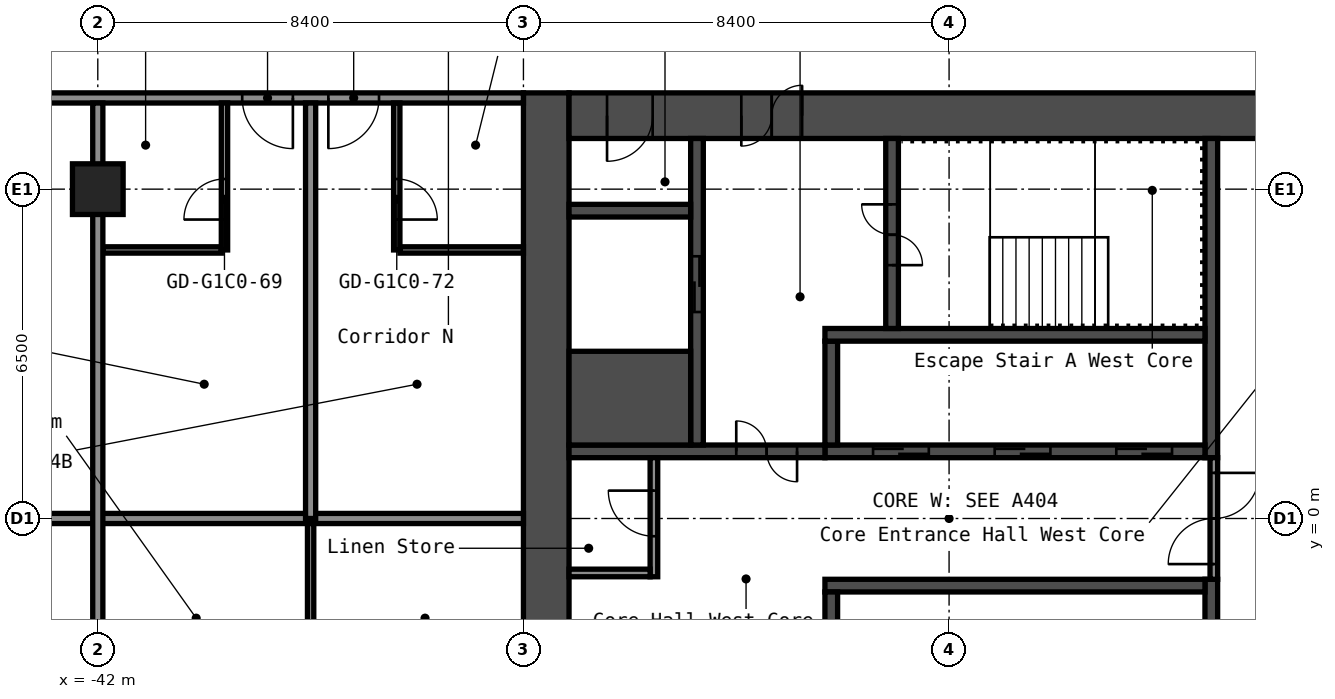
"""IFC4 building model, lengths in metres.
Left out: names, types, materials, properties, quantities, classifications, styles, units other than length and angle.
Written with IfcOpenShell. Run it as: python <this file> out.ifc"""

import sys

from ifc_helpers import new_model, si_unit, direction, frame, frame_2d, origin, origin_2d, place, context, subcontext, project, spatial, rectangle, hollow_rectangle, extrude, element, fill, save


model = new_model("IFC4")
c1 = context("Model", 3, precision=1e-05, world=origin(), true_north=direction((0.0, 1.0)))
c2 = subcontext(c1, "Body", "Model", "MODEL_VIEW")
j1 = project(units=[si_unit("LENGTHUNIT", "METRE"), si_unit("PLANEANGLEUNIT", "RADIAN")], contexts=[c1])
p1 = place(None, origin())
s1 = spatial("IfcSite", under=j1, at=p1, CompositionType="ELEMENT")
p2 = place(p1, origin())
s2 = spatial("IfcBuilding", under=s1, at=p2, CompositionType="ELEMENT")
p3 = place(p2, frame((0.0, 0.0, 26.2)))
s3 = spatial("IfcBuildingStorey", under=s2, at=p3, CompositionType="ELEMENT", Elevation=26.2)
p4 = place(p3, frame((-42.0, 6.5, 0.0), z_axis=(0.0, 0.0, 1.0), x_axis=(1.0, 0.0, 0.0)))
e1 = element("IfcColumn", 1, at=p4, inside=s3, PredefinedType="COLUMN", context=c2, shape_type="SweptSolid", body=[
    extrude(hollow_rectangle(XDim=1.0, YDim=1.0, WallThickness=0.04, at=origin_2d()), origin(), (0.0, 0.0, 1.0), 2.8),
])
p5 = place(p3, frame((-33.15, -8.4, 0.0), z_axis=(0.0, 0.0, 1.0), x_axis=(0.0, 1.0, 0.0)))
e2 = element("IfcWall", 2, at=p5, inside=s3, PredefinedType="SHEAR", context=c2, shape_type="SweptSolid", body=[
    extrude(rectangle(XDim=16.8, YDim=0.9, at=frame_2d((8.4, 0.0))), origin(), (0.0, 0.0, 1.0), 2.8),
])
p6 = place(p3, frame((-32.7, 7.95, 0.0), z_axis=(0.0, 0.0, 1.0), x_axis=(1.0, 0.0, 0.0)))
e3 = element("IfcWall", 3, at=p6, inside=s3, PredefinedType="SHEAR", context=c2, shape_type="SweptSolid", body=[
    extrude(rectangle(XDim=15.0, YDim=0.9, at=frame_2d((7.5, 0.0))), origin(), (0.0, 0.0, 1.0), 2.8),
])
p7 = place(p6, frame((3.4, 0.0, 0.0)))
e4 = element("IfcOpeningElement", 4, at=p7, cuts=e3, PredefinedType="OPENING", context=c2, shape_type="SweptSolid", body=[
    extrude(rectangle(XDim=1.2, YDim=2.1, at=frame_2d((0.6, 1.05))), frame((0.0, 0.46, 0.0), z_axis=(0.0, -1.0, 0.0), x_axis=(1.0, 0.0, 0.0)), (0.0, 0.0, 1.0), 0.92),
])
p8 = place(p6, frame((0.75, 0.0, 0.0)))
e5 = element("IfcOpeningElement", 5, at=p8, cuts=e3, PredefinedType="OPENING", context=c2, shape_type="SweptSolid", body=[
    extrude(rectangle(XDim=0.9, YDim=2.1, at=frame_2d((0.45, 1.05))), frame((0.0, 0.46, 0.0), z_axis=(0.0, -1.0, 0.0), x_axis=(1.0, 0.0, 0.0)), (0.0, 0.0, 1.0), 0.92),
])
p9 = place(p3, frame((-20.025, 1.2, 0.0), z_axis=(0.0, 0.0, 1.0), x_axis=(0.0, 1.0, 0.0)))
e6 = element("IfcWall", 6, at=p9, inside=s3, PredefinedType="SHEAR", context=c2, shape_type="SweptSolid", body=[
    extrude(rectangle(XDim=6.3, YDim=0.25, at=frame_2d((3.15, 0.0))), origin(), (0.0, 0.0, 1.0), 2.8),
])
p10 = place(p3, frame((-20.025, -7.5, 0.0), z_axis=(0.0, 0.0, 1.0), x_axis=(0.0, 1.0, 0.0)))
e7 = element("IfcWall", 7, at=p10, inside=s3, PredefinedType="SHEAR", context=c2, shape_type="SweptSolid", body=[
    extrude(rectangle(XDim=6.3, YDim=0.25, at=frame_2d((3.15, 0.0))), origin(), (0.0, 0.0, 1.0), 2.8),
])
p11 = place(p10, frame((2.4, 0.0, 0.0)))
e8 = element("IfcOpeningElement", 8, at=p11, cuts=e7, PredefinedType="OPENING", context=c2, shape_type="SweptSolid", body=[
    extrude(rectangle(XDim=1.0, YDim=2.1, at=frame_2d((0.5, 1.05))), frame((0.0, 0.135, 0.0), z_axis=(0.0, -1.0, 0.0), x_axis=(1.0, 0.0, 0.0)), (0.0, 0.0, 1.0), 0.27),
])
p12 = place(p3, frame((-27.65, 1.325, 0.0), z_axis=(0.0, 0.0, 1.0), x_axis=(1.0, 0.0, 0.0)))
e9 = element("IfcWall", 9, at=p12, inside=s3, PredefinedType="SHEAR", context=c2, shape_type="SweptSolid", body=[
    extrude(rectangle(XDim=7.5, YDim=0.25, at=frame_2d((3.75, 0.0))), origin(), (0.0, 0.0, 1.0), 2.8),
])
p13 = place(p12, frame((5.75, 0.0, 0.0)))
e10 = element("IfcOpeningElement", 10, at=p13, cuts=e9, PredefinedType="OPENING", context=c2, shape_type="SweptSolid", body=[
    extrude(rectangle(XDim=1.1, YDim=2.1, at=frame_2d((0.55, 1.05))), frame((0.0, 0.135, 0.0), z_axis=(0.0, -1.0, 0.0), x_axis=(1.0, 0.0, 0.0)), (0.0, 0.0, 1.0), 0.27),
])
p14 = place(p12, frame((3.35, 0.0, 0.0)))
e11 = element("IfcOpeningElement", 11, at=p14, cuts=e9, PredefinedType="OPENING", context=c2, shape_type="SweptSolid", body=[
    extrude(rectangle(XDim=1.1, YDim=2.1, at=frame_2d((0.55, 1.05))), frame((0.0, 0.135, 0.0), z_axis=(0.0, -1.0, 0.0), x_axis=(1.0, 0.0, 0.0)), (0.0, 0.0, 1.0), 0.27),
])
p15 = place(p12, frame((0.95, 0.0, 0.0)))
e12 = element("IfcOpeningElement", 12, at=p15, cuts=e9, PredefinedType="OPENING", context=c2, shape_type="SweptSolid", body=[
    extrude(rectangle(XDim=1.1, YDim=2.1, at=frame_2d((0.55, 1.05))), frame((0.0, 0.135, 0.0), z_axis=(0.0, -1.0, 0.0), x_axis=(1.0, 0.0, 0.0)), (0.0, 0.0, 1.0), 0.27),
])
p16 = place(p3, frame((-27.525, 1.45, 0.0), z_axis=(0.0, 0.0, 1.0), x_axis=(0.0, 1.0, 0.0)))
e13 = element("IfcWall", 13, at=p16, inside=s3, PredefinedType="SHEAR", context=c2, shape_type="SweptSolid", body=[
    extrude(rectangle(XDim=2.05, YDim=0.25, at=frame_2d((1.025, 0.0))), origin(), (0.0, 0.0, 1.0), 2.8),
])
p17 = place(p3, frame((-27.65, 3.625, 0.0), z_axis=(0.0, 0.0, 1.0), x_axis=(1.0, 0.0, 0.0)))
e14 = element("IfcWall", 14, at=p17, inside=s3, PredefinedType="SHEAR", context=c2, shape_type="SweptSolid", body=[
    extrude(rectangle(XDim=7.5, YDim=0.25, at=frame_2d((3.75, 0.0))), origin(), (0.0, 0.0, 1.0), 2.8),
])
p18 = place(p3, frame((-26.325, 3.75, 0.0), z_axis=(0.0, 0.0, 1.0), x_axis=(0.0, 1.0, 0.0)))
e15 = element("IfcWall", 15, at=p18, inside=s3, PredefinedType="SHEAR", context=c2, shape_type="SweptSolid", body=[
    extrude(rectangle(XDim=3.75, YDim=0.25, at=frame_2d((1.875, 0.0))), origin(), (0.0, 0.0, 1.0), 2.8),
])
p19 = place(p18, frame((1.25, 0.0, 0.0)))
e16 = element("IfcOpeningElement", 16, at=p19, cuts=e15, PredefinedType="OPENING", context=c2, shape_type="SweptSolid", body=[
    extrude(rectangle(XDim=1.2, YDim=2.1, at=frame_2d((0.6, 1.05))), frame((0.0, 0.135, 0.0), z_axis=(0.0, -1.0, 0.0), x_axis=(1.0, 0.0, 0.0)), (0.0, 0.0, 1.0), 0.27),
])
p20 = place(p3, frame((-32.7, 1.325, 0.0), z_axis=(0.0, 0.0, 1.0), x_axis=(1.0, 0.0, 0.0)))
e17 = element("IfcWall", 17, at=p20, inside=s3, PredefinedType="SHEAR", context=c2, shape_type="SweptSolid", body=[
    extrude(rectangle(XDim=5.05, YDim=0.25, at=frame_2d((2.525, 0.0))), origin(), (0.0, 0.0, 1.0), 2.8),
])
p21 = place(p20, frame((3.3, 0.0, 0.0)))
e18 = element("IfcOpeningElement", 18, at=p21, cuts=e17, PredefinedType="OPENING", context=c2, shape_type="SweptSolid", body=[
    extrude(rectangle(XDim=1.2, YDim=2.1, at=frame_2d((0.6, 1.05))), frame((0.0, 0.135, 0.0), z_axis=(0.0, -1.0, 0.0), x_axis=(1.0, 0.0, 0.0)), (0.0, 0.0, 1.0), 0.27),
])
p22 = place(p3, frame((-30.175, 1.45, 0.0), z_axis=(0.0, 0.0, 1.0), x_axis=(0.0, 1.0, 0.0)))
e19 = element("IfcWall", 19, at=p22, inside=s3, PredefinedType="SHEAR", context=c2, shape_type="SweptSolid", body=[
    extrude(rectangle(XDim=6.05, YDim=0.25, at=frame_2d((3.025, 0.0))), origin(), (0.0, 0.0, 1.0), 2.8),
])
p23 = place(p22, frame((2.625, 0.0, 0.0)))
e20 = element("IfcOpeningElement", 20, at=p23, cuts=e19, PredefinedType="OPENING", context=c2, shape_type="SweptSolid", body=[
    extrude(rectangle(XDim=1.1, YDim=2.1, at=frame_2d((0.55, 1.05))), frame((0.0, 0.135, 0.0), z_axis=(0.0, -1.0, 0.0), x_axis=(1.0, 0.0, 0.0)), (0.0, 0.0, 1.0), 0.27),
])
p24 = place(p3, frame((-32.7, 2.375, 0.0), z_axis=(0.0, 0.0, 1.0), x_axis=(1.0, 0.0, 0.0)))
e21 = element("IfcWall", 21, at=p24, inside=s3, PredefinedType="SHEAR", context=c2, shape_type="SweptSolid", body=[
    extrude(rectangle(XDim=2.4, YDim=1.85, at=frame_2d((1.2, 0.0))), origin(), (0.0, 0.0, 1.0), 2.8),
])
p25 = place(p3, frame((-32.7, 6.075, 0.0), z_axis=(0.0, 0.0, 1.0), x_axis=(1.0, 0.0, 0.0)))
e22 = element("IfcWall", 22, at=p25, inside=s3, PredefinedType="SHEAR", context=c2, shape_type="SweptSolid", body=[
    extrude(rectangle(XDim=2.4, YDim=0.25, at=frame_2d((1.2, 0.0))), origin(), (0.0, 0.0, 1.0), 2.8),
])
p26 = place(p3, frame((-27.65, -1.325, 0.0), z_axis=(0.0, 0.0, 1.0), x_axis=(1.0, 0.0, 0.0)))
e23 = element("IfcWall", 23, at=p26, inside=s3, PredefinedType="SHEAR", context=c2, shape_type="SweptSolid", body=[
    extrude(rectangle(XDim=7.5, YDim=0.25, at=frame_2d((3.75, 0.0))), origin(), (0.0, 0.0, 1.0), 2.8),
])
p27 = place(p3, frame((-27.525, -3.5, 0.0), z_axis=(0.0, 0.0, 1.0), x_axis=(0.0, 1.0, 0.0)))
e24 = element("IfcWall", 24, at=p27, inside=s3, PredefinedType="SHEAR", context=c2, shape_type="SweptSolid", body=[
    extrude(rectangle(XDim=2.05, YDim=0.25, at=frame_2d((1.025, 0.0))), origin(), (0.0, 0.0, 1.0), 2.8),
])
p28 = place(p3, frame((-19.975, -1.2, 0.0), z_axis=(0.0, 0.0, 1.0), x_axis=(0.0, 1.0, 0.0)))
e25 = element("IfcWall", 25, at=p28, inside=s3, PredefinedType="PARTITIONING", context=c2, shape_type="SweptSolid", body=[
    extrude(rectangle(XDim=2.4, YDim=0.15, at=frame_2d((1.2, 0.0))), origin(), (0.0, 0.0, 1.0), 2.8),
])
p29 = place(p28, frame((0.3, 0.0, 0.0)))
e26 = element("IfcOpeningElement", 26, at=p29, cuts=e25, PredefinedType="OPENING", context=c2, shape_type="SweptSolid", body=[
    extrude(rectangle(XDim=1.8, YDim=2.1, at=frame_2d((0.9, 1.05))), frame((0.0, 0.085, 0.0), z_axis=(0.0, -1.0, 0.0), x_axis=(1.0, 0.0, 0.0)), (0.0, 0.0, 1.0), 0.17),
])
p30 = place(p3, frame((-31.025, -1.15, 0.0), z_axis=(0.0, 0.0, 1.0), x_axis=(0.0, 1.0, 0.0)))
e27 = element("IfcWall", 27, at=p30, inside=s3, PredefinedType="PARTITIONING", context=c2, shape_type="SweptSolid", body=[
    extrude(rectangle(XDim=2.35, YDim=0.15, at=frame_2d((1.175, 0.0))), origin(), (0.0, 0.0, 1.0), 2.8),
])
p31 = place(p30, frame((0.8, 0.0, 0.0)))
e28 = element("IfcOpeningElement", 28, at=p31, cuts=e27, PredefinedType="OPENING", context=c2, shape_type="SweptSolid", body=[
    extrude(rectangle(XDim=0.9, YDim=2.1, at=frame_2d((0.45, 1.05))), frame((0.0, 0.085, 0.0), z_axis=(0.0, -1.0, 0.0), x_axis=(1.0, 0.0, 0.0)), (0.0, 0.0, 1.0), 0.17),
])
p32 = place(p3, frame((-32.7, -1.075, 0.0), z_axis=(0.0, 0.0, 1.0), x_axis=(1.0, 0.0, 0.0)))
e29 = element("IfcWall", 29, at=p32, inside=s3, PredefinedType="PARTITIONING", context=c2, shape_type="SweptSolid", body=[
    extrude(rectangle(XDim=1.6, YDim=0.15, at=frame_2d((0.8, 0.0))), origin(), (0.0, 0.0, 1.0), 2.8),
])
p33 = place(p3, frame((-48.5, 0.0, 0.0), z_axis=(0.0, 0.0, 1.0), x_axis=(1.0, 0.0, 0.0)))
e30 = element("IfcWall", 30, at=p33, inside=s3, PredefinedType="PARTITIONING", context=c2, shape_type="SweptSolid", body=[
    extrude(rectangle(XDim=14.9, YDim=0.2, at=frame_2d((7.45, 0.0))), origin(), (0.0, 0.0, 1.0), 2.8),
])
p34 = place(p3, frame((-41.9, 5.3, 0.0), z_axis=(0.0, 0.0, 1.0), x_axis=(1.0, 0.0, 0.0)))
e31 = element("IfcWall", 31, at=p34, inside=s3, PredefinedType="PARTITIONING", context=c2, shape_type="SweptSolid", body=[
    extrude(rectangle(XDim=2.337, YDim=0.125, at=frame_2d((1.169, 0.0))), origin(), (0.0, 0.0, 1.0), 2.8),
])
p35 = place(p3, frame((-36.038, 5.3, 0.0), z_axis=(0.0, 0.0, 1.0), x_axis=(1.0, 0.0, 0.0)))
e32 = element("IfcWall", 32, at=p35, inside=s3, PredefinedType="PARTITIONING", context=c2, shape_type="SweptSolid", body=[
    extrude(rectangle(XDim=2.438, YDim=0.125, at=frame_2d((1.219, 0.0))), origin(), (0.0, 0.0, 1.0), 2.8),
])
p36 = place(p3, frame((-48.6, 8.3, 0.0), z_axis=(0.0, 0.0, 1.0), x_axis=(1.0, 0.0, 0.0)))
e33 = element("IfcWall", 33, at=p36, inside=s3, PredefinedType="PARTITIONING", context=c2, shape_type="SweptSolid", body=[
    extrude(rectangle(XDim=15.0, YDim=0.2, at=frame_2d((7.5, 0.0))), origin(), (0.0, 0.0, 1.0), 2.8),
])
p37 = place(p36, frame((4.05, 0.0, 0.0)))
e34 = element("IfcOpeningElement", 34, at=p37, cuts=e33, PredefinedType="OPENING", context=c2, shape_type="SweptSolid", body=[
    extrude(rectangle(XDim=1.0, YDim=2.1, at=frame_2d((0.5, 1.05))), frame((0.0, 0.11, 0.0), z_axis=(0.0, -1.0, 0.0), x_axis=(1.0, 0.0, 0.0)), (0.0, 0.0, 1.0), 0.22),
])
p38 = place(p36, frame((9.45, 0.0, 0.0)))
e35 = element("IfcOpeningElement", 35, at=p38, cuts=e33, PredefinedType="OPENING", context=c2, shape_type="SweptSolid", body=[
    extrude(rectangle(XDim=1.0, YDim=2.1, at=frame_2d((0.5, 1.05))), frame((0.0, 0.11, 0.0), z_axis=(0.0, -1.0, 0.0), x_axis=(1.0, 0.0, 0.0)), (0.0, 0.0, 1.0), 0.22),
])
p39 = place(p36, frame((11.15, 0.0, 0.0)))
e36 = element("IfcOpeningElement", 36, at=p39, cuts=e33, PredefinedType="OPENING", context=c2, shape_type="SweptSolid", body=[
    extrude(rectangle(XDim=1.0, YDim=2.1, at=frame_2d((0.5, 1.05))), frame((0.0, 0.11, 0.0), z_axis=(0.0, -1.0, 0.0), x_axis=(1.0, 0.0, 0.0)), (0.0, 0.0, 1.0), 0.22),
])
p40 = place(p3, frame((-42.0, -8.2, 0.0), z_axis=(0.0, 0.0, 1.0), x_axis=(0.0, 1.0, 0.0)))
e37 = element("IfcWall", 37, at=p40, inside=s3, PredefinedType="PARTITIONING", context=c2, shape_type="SweptSolid", body=[
    extrude(rectangle(XDim=16.4, YDim=0.2, at=frame_2d((8.2, 0.0))), origin(), (0.0, 0.0, 1.0), 2.8),
])
p41 = place(p3, frame((-39.5, 5.3, 0.0), z_axis=(0.0, 0.0, 1.0), x_axis=(0.0, 1.0, 0.0)))
e38 = element("IfcWall", 38, at=p41, inside=s3, PredefinedType="PARTITIONING", context=c2, shape_type="SweptSolid", body=[
    extrude(rectangle(XDim=2.9, YDim=0.125, at=frame_2d((1.45, 0.0))), origin(), (0.0, 0.0, 1.0), 2.8),
])
p42 = place(p41, frame((0.6, 0.0, 0.0)))
e39 = element("IfcOpeningElement", 39, at=p42, cuts=e38, PredefinedType="OPENING", context=c2, shape_type="SweptSolid", body=[
    extrude(rectangle(XDim=0.8, YDim=2.1, at=frame_2d((0.4, 1.05))), frame((0.0, 0.073, 0.0), z_axis=(0.0, -1.0, 0.0), x_axis=(1.0, 0.0, 0.0)), (0.0, 0.0, 1.0), 0.145),
])
p43 = place(p3, frame((-37.8, -8.2, 0.0), z_axis=(0.0, 0.0, 1.0), x_axis=(0.0, 1.0, 0.0)))
e40 = element("IfcWall", 40, at=p43, inside=s3, PredefinedType="PARTITIONING", context=c2, shape_type="SweptSolid", body=[
    extrude(rectangle(XDim=8.1, YDim=0.125, at=frame_2d((4.05, 0.0))), origin(), (0.0, 0.0, 1.0), 2.8),
])
p44 = place(p43, frame((4.05, 0.0, 0.0)))
e41 = element("IfcOpeningElement", 41, at=p44, cuts=e40, PredefinedType="OPENING", context=c2, shape_type="SweptSolid", body=[
    extrude(rectangle(XDim=0.9, YDim=2.1, at=frame_2d((0.45, 1.05))), frame((0.0, 0.073, 0.0), z_axis=(0.0, -1.0, 0.0), x_axis=(1.0, 0.0, 0.0)), (0.0, 0.0, 1.0), 0.145),
])
p45 = place(p3, frame((-37.8, 0.0, 0.0), z_axis=(0.0, 0.0, 1.0), x_axis=(0.0, 1.0, 0.0)))
e42 = element("IfcWall", 42, at=p45, inside=s3, PredefinedType="PARTITIONING", context=c2, shape_type="SweptSolid", body=[
    extrude(rectangle(XDim=8.2, YDim=0.2, at=frame_2d((4.1, 0.0))), origin(), (0.0, 0.0, 1.0), 2.8),
])
p46 = place(p3, frame((-36.1, 5.3, 0.0), z_axis=(0.0, 0.0, 1.0), x_axis=(0.0, 1.0, 0.0)))
e43 = element("IfcWall", 43, at=p46, inside=s3, PredefinedType="PARTITIONING", context=c2, shape_type="SweptSolid", body=[
    extrude(rectangle(XDim=2.9, YDim=0.125, at=frame_2d((1.45, 0.0))), origin(), (0.0, 0.0, 1.0), 2.8),
])
p47 = place(p46, frame((0.6, 0.0, 0.0)))
e44 = element("IfcOpeningElement", 44, at=p47, cuts=e43, PredefinedType="OPENING", context=c2, shape_type="SweptSolid", body=[
    extrude(rectangle(XDim=0.8, YDim=2.1, at=frame_2d((0.4, 1.05))), frame((0.0, 0.073, 0.0), z_axis=(0.0, -1.0, 0.0), x_axis=(1.0, 0.0, 0.0)), (0.0, 0.0, 1.0), 0.145),
])
p48 = place(p7, origin())
e45 = element("IfcDoor", 45, at=p48, inside=s3, OperationType="DOUBLE_DOOR_SINGLE_SWING", PredefinedType="DOOR", context=c2, shape_type="SweptSolid", body=[
    extrude(rectangle(XDim=1.2, YDim=2.1, at=frame_2d((0.6, 1.05))), frame((0.0, 0.025, 0.0), z_axis=(0.0, -1.0, 0.0), x_axis=(1.0, 0.0, 0.0)), (0.0, 0.0, 1.0), 0.05),
])
fill(e4, e45)
p49 = place(p8, origin())
e46 = element("IfcDoor", 46, at=p49, inside=s3, OperationType="SINGLE_SWING_LEFT", PredefinedType="DOOR", context=c2, shape_type="SweptSolid", body=[
    extrude(rectangle(XDim=0.9, YDim=2.1, at=frame_2d((0.45, 1.05))), frame((0.0, 0.025, 0.0), z_axis=(0.0, -1.0, 0.0), x_axis=(1.0, 0.0, 0.0)), (0.0, 0.0, 1.0), 0.05),
])
fill(e5, e46)
p50 = place(p19, origin())
e47 = element("IfcDoor", 47, at=p50, inside=s3, OperationType="DOUBLE_DOOR_SINGLE_SWING", PredefinedType="DOOR", context=c2, shape_type="SweptSolid", body=[
    extrude(rectangle(XDim=1.2, YDim=2.1, at=frame_2d((0.6, 1.05))), frame((0.0, 0.025, 0.0), z_axis=(0.0, -1.0, 0.0), x_axis=(1.0, 0.0, 0.0)), (0.0, 0.0, 1.0), 0.05),
])
fill(e16, e47)
p51 = place(p21, origin())
e48 = element("IfcDoor", 48, at=p51, inside=s3, OperationType="DOUBLE_DOOR_SINGLE_SWING", PredefinedType="DOOR", context=c2, shape_type="SweptSolid", body=[
    extrude(rectangle(XDim=1.2, YDim=2.1, at=frame_2d((0.6, 1.05))), frame((0.0, 0.025, 0.0), z_axis=(0.0, -1.0, 0.0), x_axis=(1.0, 0.0, 0.0)), (0.0, 0.0, 1.0), 0.05),
])
fill(e18, e48)
p52 = place(p29, origin())
e49 = element("IfcDoor", 49, at=p52, inside=s3, OperationType="DOUBLE_DOOR_SINGLE_SWING", PredefinedType="DOOR", context=c2, shape_type="SweptSolid", body=[
    extrude(rectangle(XDim=1.8, YDim=2.1, at=frame_2d((0.9, 1.05))), frame((0.0, 0.025, 0.0), z_axis=(0.0, -1.0, 0.0), x_axis=(1.0, 0.0, 0.0)), (0.0, 0.0, 1.0), 0.05),
])
fill(e26, e49)
p53 = place(p31, origin())
e50 = element("IfcDoor", 50, at=p53, inside=s3, OperationType="SINGLE_SWING_LEFT", PredefinedType="DOOR", context=c2, shape_type="SweptSolid", body=[
    extrude(rectangle(XDim=0.9, YDim=2.1, at=frame_2d((0.45, 1.05))), frame((0.0, 0.025, 0.0), z_axis=(0.0, -1.0, 0.0), x_axis=(1.0, 0.0, 0.0)), (0.0, 0.0, 1.0), 0.05),
])
fill(e28, e50)
p54 = place(p13, origin())
e51 = element("IfcDoor", 51, at=p54, inside=s3, OperationType="DOUBLE_DOOR_SLIDING", PredefinedType="DOOR", context=c2, shape_type="SweptSolid", body=[
    extrude(rectangle(XDim=1.1, YDim=2.1, at=frame_2d((0.55, 1.05))), frame((0.0, 0.025, 0.0), z_axis=(0.0, -1.0, 0.0), x_axis=(1.0, 0.0, 0.0)), (0.0, 0.0, 1.0), 0.05),
])
fill(e10, e51)
p55 = place(p14, origin())
e52 = element("IfcDoor", 52, at=p55, inside=s3, OperationType="DOUBLE_DOOR_SLIDING", PredefinedType="DOOR", context=c2, shape_type="SweptSolid", body=[
    extrude(rectangle(XDim=1.1, YDim=2.1, at=frame_2d((0.55, 1.05))), frame((0.0, 0.025, 0.0), z_axis=(0.0, -1.0, 0.0), x_axis=(1.0, 0.0, 0.0)), (0.0, 0.0, 1.0), 0.05),
])
fill(e11, e52)
p56 = place(p15, origin())
e53 = element("IfcDoor", 53, at=p56, inside=s3, OperationType="DOUBLE_DOOR_SLIDING", PredefinedType="DOOR", context=c2, shape_type="SweptSolid", body=[
    extrude(rectangle(XDim=1.1, YDim=2.1, at=frame_2d((0.55, 1.05))), frame((0.0, 0.025, 0.0), z_axis=(0.0, -1.0, 0.0), x_axis=(1.0, 0.0, 0.0)), (0.0, 0.0, 1.0), 0.05),
])
fill(e12, e53)
p57 = place(p23, origin())
e54 = element("IfcDoor", 54, at=p57, inside=s3, OperationType="DOUBLE_DOOR_SLIDING", PredefinedType="DOOR", context=c2, shape_type="SweptSolid", body=[
    extrude(rectangle(XDim=1.1, YDim=2.1, at=frame_2d((0.55, 1.05))), frame((0.0, 0.025, 0.0), z_axis=(0.0, -1.0, 0.0), x_axis=(1.0, 0.0, 0.0)), (0.0, 0.0, 1.0), 0.05),
])
fill(e20, e54)
p58 = place(p38, origin())
e55 = element("IfcDoor", 55, at=p58, inside=s3, OperationType="SINGLE_SWING_RIGHT", PredefinedType="DOOR", context=c2, shape_type="SweptSolid", body=[
    extrude(rectangle(XDim=1.0, YDim=2.1, at=frame_2d((0.5, 1.05))), frame((0.0, 0.025, 0.0), z_axis=(0.0, -1.0, 0.0), x_axis=(1.0, 0.0, 0.0)), (0.0, 0.0, 1.0), 0.05),
])
fill(e35, e55)
p59 = place(p39, origin())
e56 = element("IfcDoor", 56, at=p59, inside=s3, OperationType="SINGLE_SWING_LEFT", PredefinedType="DOOR", context=c2, shape_type="SweptSolid", body=[
    extrude(rectangle(XDim=1.0, YDim=2.1, at=frame_2d((0.5, 1.05))), frame((0.0, 0.025, 0.0), z_axis=(0.0, -1.0, 0.0), x_axis=(1.0, 0.0, 0.0)), (0.0, 0.0, 1.0), 0.05),
])
fill(e36, e56)
p60 = place(p42, origin())
e57 = element("IfcDoor", 57, at=p60, inside=s3, OperationType="SINGLE_SWING_RIGHT", PredefinedType="DOOR", context=c2, shape_type="SweptSolid", body=[
    extrude(rectangle(XDim=0.8, YDim=2.1, at=frame_2d((0.4, 1.05))), frame((0.0, 0.025, 0.0), z_axis=(0.0, -1.0, 0.0), x_axis=(1.0, 0.0, 0.0)), (0.0, 0.0, 1.0), 0.05),
])
fill(e39, e57)
p61 = place(p47, origin())
e58 = element("IfcDoor", 58, at=p61, inside=s3, OperationType="SINGLE_SWING_LEFT", PredefinedType="DOOR", context=c2, shape_type="SweptSolid", body=[
    extrude(rectangle(XDim=0.8, YDim=2.1, at=frame_2d((0.4, 1.05))), frame((0.0, 0.025, 0.0), z_axis=(0.0, -1.0, 0.0), x_axis=(1.0, 0.0, 0.0)), (0.0, 0.0, 1.0), 0.05),
])
fill(e44, e58)
save(model, sys.argv[1])
